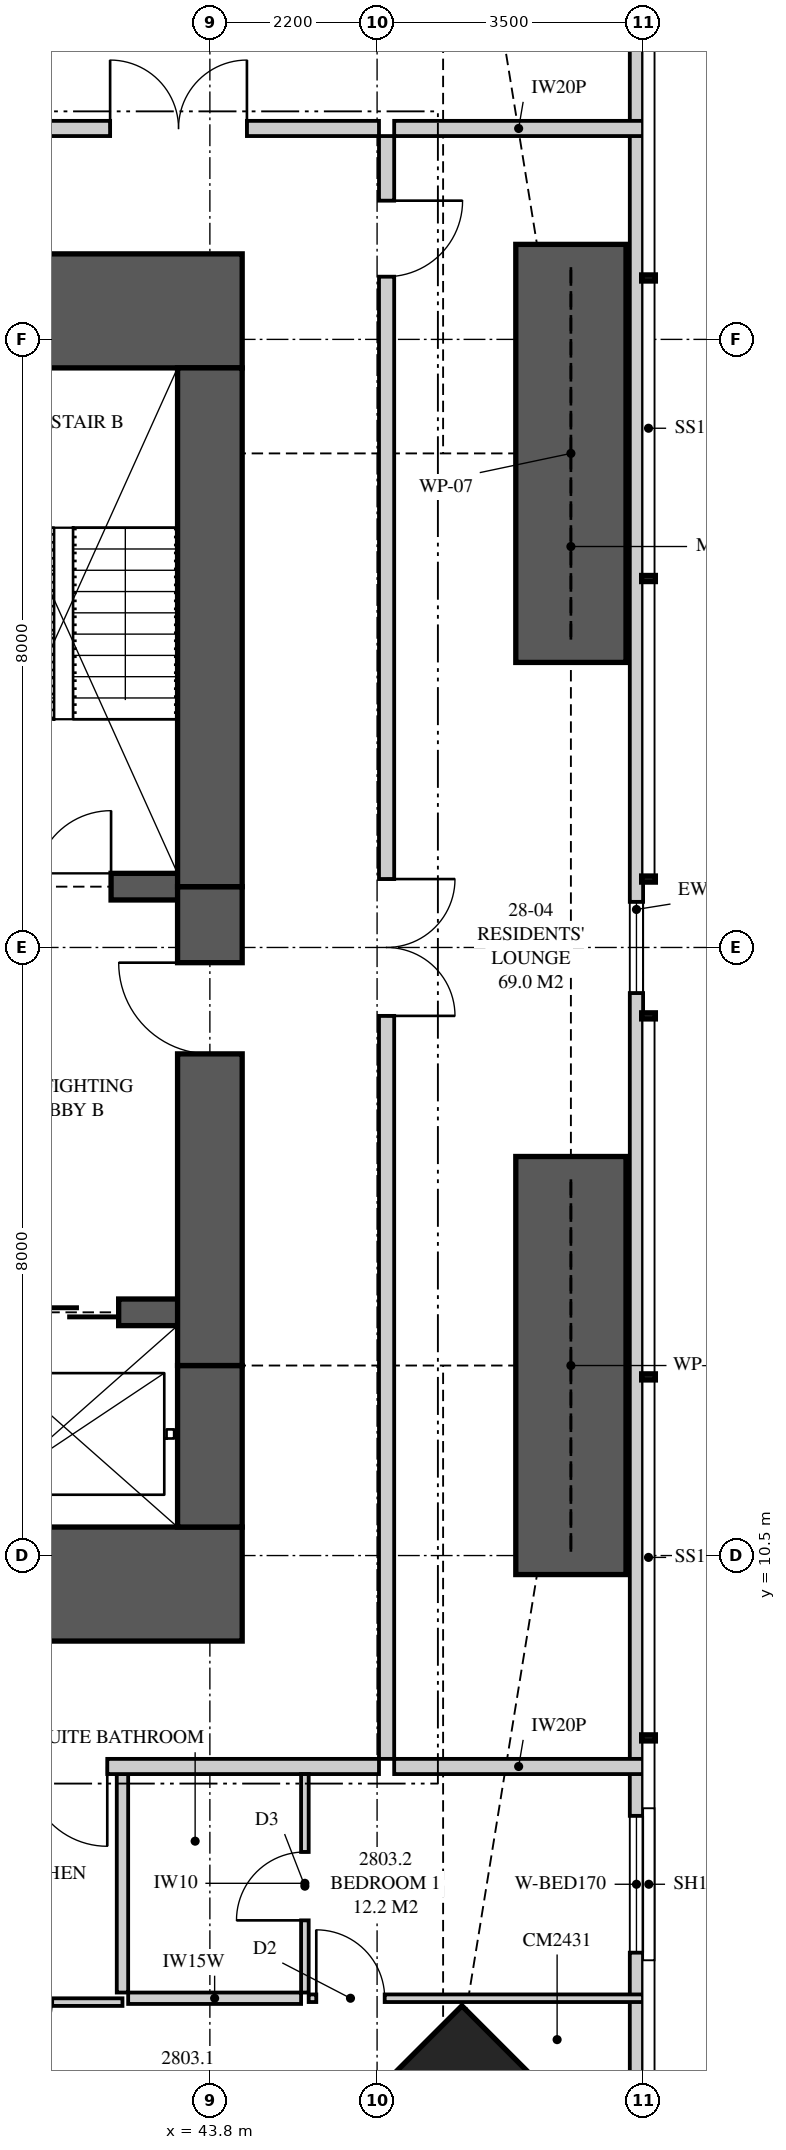
"""IFC4 building model, lengths in metres.
Left out: names, types, materials, properties, quantities, classifications, styles, units other than length and angle.
Written with IfcOpenShell. Run it as: python <this file> out.ifc"""

import sys

from ifc_helpers import new_model, si_unit, direction, frame, frame_2d, origin, origin_2d, place, context, subcontext, project, spatial, polyline, rectangle, outline, extrude, element, fill, save


model = new_model("IFC4")
c1 = context("Model", 3, precision=1e-05, world=origin(), true_north=direction((0.0, 1.0)))
c2 = subcontext(c1, "Body", "Model", "MODEL_VIEW")
j1 = project(units=[si_unit("LENGTHUNIT", "METRE"), si_unit("PLANEANGLEUNIT", "RADIAN")], contexts=[c1])
p1 = place(None, origin())
s1 = spatial("IfcSite", under=j1, at=p1, CompositionType="ELEMENT")
p2 = place(p1, origin())
s2 = spatial("IfcBuilding", under=s1, at=p2, CompositionType="ELEMENT")
p3 = place(p2, frame((0.0, 0.0, 104.85)))
s3 = spatial("IfcBuildingStorey", under=s2, at=p3, CompositionType="ELEMENT", Elevation=104.85)
p4 = place(p3, frame((46.869, 2.631, 0.0), z_axis=(0.0, 0.0, 1.0), x_axis=(-0.707106781187, 0.707106781187, 0.0)))
e1 = element("IfcColumn", 1, at=p4, inside=s3, PredefinedType="COLUMN", context=c2, shape_type="SweptSolid", body=[
    extrude(rectangle(XDim=2.4, YDim=3.1, at=origin_2d()), origin(), (0.0, 0.0, 1.0), 3.35),
])
p5 = place(p3, frame((35.9, 10.125, 0.0), z_axis=(0.0, 0.0, 1.0), x_axis=(1.0, 0.0, 0.0)))
e2 = element("IfcWall", 2, at=p5, inside=s3, PredefinedType="SHEAR", context=c2, shape_type="SweptSolid", body=[
    extrude(rectangle(XDim=8.325, YDim=1.5, at=frame_2d((4.163, 0.0))), origin(), (0.0, 0.0, 1.0), 3.35),
])
p6 = place(p5, frame((2.7, 0.0, 0.0)))
e3 = element("IfcOpeningElement", 3, at=p6, cuts=e2, PredefinedType="OPENING", context=c2, shape_type="SweptSolid", body=[
    extrude(rectangle(XDim=1.0, YDim=2.1, at=frame_2d((0.5, 1.05))), frame((0.0, 0.76, 0.0), z_axis=(0.0, -1.0, 0.0), x_axis=(1.0, 0.0, 0.0)), (0.0, 0.0, 1.0), 1.52),
])
p7 = place(p3, frame((44.225, 26.875, 0.0), z_axis=(0.0, 0.0, 1.0), x_axis=(-1.0, 0.0, 0.0)))
e4 = element("IfcWall", 4, at=p7, inside=s3, PredefinedType="SHEAR", context=c2, shape_type="SweptSolid", body=[
    extrude(rectangle(XDim=8.325, YDim=1.5, at=frame_2d((4.163, 0.0))), origin(), (0.0, 0.0, 1.0), 3.35),
])
p8 = place(p7, frame((5.725, 0.0, 0.0)))
e5 = element("IfcOpeningElement", 5, at=p8, cuts=e4, PredefinedType="OPENING", context=c2, shape_type="SweptSolid", body=[
    extrude(rectangle(XDim=0.9, YDim=2.1, at=frame_2d((0.45, 1.05))), frame((0.0, 0.76, 0.0), z_axis=(0.0, -1.0, 0.0), x_axis=(1.0, 0.0, 0.0)), (0.0, 0.0, 1.0), 1.52),
])
p9 = place(p3, frame((43.8, 10.875, 0.0), z_axis=(0.0, 0.0, 1.0), x_axis=(0.0, 1.0, 0.0)))
e6 = element("IfcWall", 6, at=p9, inside=s3, PredefinedType="SHEAR", context=c2, shape_type="SweptSolid", body=[
    extrude(rectangle(XDim=2.125, YDim=0.85, at=frame_2d((1.062, 0.0))), origin(), (0.0, 0.0, 1.0), 3.35),
])
p10 = place(p3, frame((43.8, 13.0, 0.0), z_axis=(0.0, 0.0, 1.0), x_axis=(0.0, 1.0, 0.0)))
e7 = element("IfcWall", 7, at=p10, inside=s3, PredefinedType="SHEAR", context=c2, shape_type="SweptSolid", body=[
    extrude(rectangle(XDim=6.3, YDim=0.85, at=frame_2d((3.15, 0.0))), origin(), (0.0, 0.0, 1.0), 3.35),
])
p11 = place(p10, frame((4.1, 0.0, 0.0)))
e8 = element("IfcOpeningElement", 8, at=p11, cuts=e7, PredefinedType="OPENING", context=c2, shape_type="SweptSolid", body=[
    extrude(rectangle(XDim=1.2, YDim=2.2, at=frame_2d((0.6, 1.1))), frame((0.0, 0.435, 0.0), z_axis=(0.0, -1.0, 0.0), x_axis=(1.0, 0.0, 0.0)), (0.0, 0.0, 1.0), 0.87),
])
p12 = place(p3, frame((43.8, 19.3, 0.0), z_axis=(0.0, 0.0, 1.0), x_axis=(0.0, 1.0, 0.0)))
e9 = element("IfcWall", 9, at=p12, inside=s3, PredefinedType="SHEAR", context=c2, shape_type="SweptSolid", body=[
    extrude(rectangle(XDim=6.825, YDim=0.85, at=frame_2d((3.413, 0.0))), origin(), (0.0, 0.0, 1.0), 3.35),
])
p13 = place(p3, frame((40.2, 13.7, 0.0), z_axis=(0.0, 0.0, 1.0), x_axis=(1.0, 0.0, 0.0)))
e10 = element("IfcWall", 10, at=p13, inside=s3, PredefinedType="SHEAR", context=c2, shape_type="SweptSolid", body=[
    extrude(rectangle(XDim=3.6, YDim=0.35, at=frame_2d((1.8, 0.0))), origin(), (0.0, 0.0, 1.0), 3.35),
])
p14 = place(p13, frame((1.2, 0.0, 0.0)))
e11 = element("IfcOpeningElement", 11, at=p14, cuts=e10, PredefinedType="OPENING", context=c2, shape_type="SweptSolid", body=[
    extrude(rectangle(XDim=1.2, YDim=2.1, at=frame_2d((0.6, 1.05))), frame((0.0, 0.185, 0.0), z_axis=(0.0, -1.0, 0.0), x_axis=(1.0, 0.0, 0.0)), (0.0, 0.0, 1.0), 0.37),
])
p15 = place(p3, frame((40.2, 19.3, 0.0), z_axis=(0.0, 0.0, 1.0), x_axis=(1.0, 0.0, 0.0)))
e12 = element("IfcWall", 12, at=p15, inside=s3, PredefinedType="SHEAR", context=c2, shape_type="SweptSolid", body=[
    extrude(rectangle(XDim=3.6, YDim=0.35, at=frame_2d((1.8, 0.0))), origin(), (0.0, 0.0, 1.0), 3.35),
])
p16 = place(p15, frame((1.3, 0.0, 0.0)))
e13 = element("IfcOpeningElement", 13, at=p16, cuts=e12, PredefinedType="OPENING", context=c2, shape_type="SweptSolid", body=[
    extrude(rectangle(XDim=1.0, YDim=2.1, at=frame_2d((0.5, 1.05))), frame((0.0, 0.185, 0.0), z_axis=(0.0, -1.0, 0.0), x_axis=(1.0, 0.0, 0.0)), (0.0, 0.0, 1.0), 0.37),
])
p17 = place(p3, frame((49.413, 3.051, 0.0), z_axis=(0.0, 0.0, 1.0), x_axis=(0.0, 1.0, 0.0)))
e14 = element("IfcWall", 14, at=p17, inside=s3, PredefinedType="SOLIDWALL", context=c2, shape_type="SweptSolid", body=[
    extrude(outline(polyline([(0.0, 0.0), (31.897, 0.0), (31.897, 3.11), (22.167, 3.11), (22.167, 2.15), (22.074, 2.15), (22.074, 3.11), (21.949, 3.11), (21.949, 2.15), (9.949, 2.15), (9.949, 3.11), (9.823, 3.11), (9.823, 2.15), (9.73, 2.15), (9.73, 3.11), (0.0, 3.11), (0.0, 0.0)])), frame((0.0, 0.087, 0.0), z_axis=(0.0, -1.0, 0.0), x_axis=(1.0, 0.0, 0.0)), (0.0, 0.0, 1.0), 0.175),
])
p18 = place(p17, frame((2.224, 0.0, 0.4)))
e15 = element("IfcOpeningElement", 15, at=p18, cuts=e14, PredefinedType="OPENING", context=c2, shape_type="SweptSolid", body=[
    extrude(rectangle(XDim=1.8, YDim=1.7, at=frame_2d((0.9, 0.85))), frame((0.0, 0.097, 0.0), z_axis=(0.0, -1.0, 0.0), x_axis=(1.0, 0.0, 0.0)), (0.0, 0.0, 1.0), 0.195),
])
p19 = place(p17, frame((14.849, 0.0, 0.4)))
e16 = element("IfcOpeningElement", 16, at=p19, cuts=e14, PredefinedType="OPENING", context=c2, shape_type="SweptSolid", body=[
    extrude(rectangle(XDim=1.2, YDim=1.7, at=frame_2d((0.6, 0.85))), frame((0.0, 0.097, 0.0), z_axis=(0.0, -1.0, 0.0), x_axis=(1.0, 0.0, 0.0)), (0.0, 0.0, 1.0), 0.195),
])
p20 = place(p17, frame((28.51, 0.0, 0.4)))
e17 = element("IfcOpeningElement", 17, at=p20, cuts=e14, PredefinedType="OPENING", context=c2, shape_type="SweptSolid", body=[
    extrude(rectangle(XDim=1.2, YDim=1.7, at=frame_2d((0.6, 0.85))), frame((0.0, 0.097, 0.0), z_axis=(0.0, -1.0, 0.0), x_axis=(1.0, 0.0, 0.0)), (0.0, 0.0, 1.0), 0.195),
])
p21 = place(p3, frame((39.9, 7.725, 0.0), z_axis=(0.0, 0.0, 1.0), x_axis=(1.0, 0.0, 0.0)))
e18 = element("IfcWall", 18, at=p21, inside=s3, PredefinedType="PARTITIONING", context=c2, shape_type="SweptSolid", body=[
    extrude(rectangle(XDim=6.125, YDim=0.2, at=frame_2d((3.062, 0.0))), origin(), (0.0, 0.0, 1.0), 3.11),
])
p22 = place(p21, frame((1.5, 0.0, 0.0)))
e19 = element("IfcOpeningElement", 19, at=p22, cuts=e18, PredefinedType="OPENING", context=c2, shape_type="SweptSolid", body=[
    extrude(rectangle(XDim=1.05, YDim=2.2, at=frame_2d((0.525, 1.1))), frame((0.0, 0.11, 0.0), z_axis=(0.0, -1.0, 0.0), x_axis=(1.0, 0.0, 0.0)), (0.0, 0.0, 1.0), 0.22),
])
p23 = place(p3, frame((45.05, 4.751, 0.0), z_axis=(0.0, 0.0, 1.0), x_axis=(0.0, 1.0, 0.0)))
e20 = element("IfcWall", 20, at=p23, inside=s3, PredefinedType="PARTITIONING", context=c2, shape_type="SweptSolid", body=[
    extrude(rectangle(XDim=2.874, YDim=0.1, at=frame_2d((1.437, 0.0))), origin(), (0.0, 0.0, 1.0), 3.11),
])
p24 = place(p23, frame((0.949, 0.0, 0.0)))
e21 = element("IfcOpeningElement", 21, at=p24, cuts=e20, PredefinedType="OPENING", context=c2, shape_type="SweptSolid", body=[
    extrude(rectangle(XDim=0.9, YDim=2.1, at=frame_2d((0.45, 1.05))), frame((0.0, 0.06, 0.0), z_axis=(0.0, -1.0, 0.0), x_axis=(1.0, 0.0, 0.0)), (0.0, 0.0, 1.0), 0.12),
])
p25 = place(p3, frame((45.1, 4.676, 0.0), z_axis=(0.0, 0.0, 1.0), x_axis=(1.0, 0.0, 0.0)))
e22 = element("IfcWall", 22, at=p25, inside=s3, PredefinedType="PARTITIONING", context=c2, shape_type="SweptSolid", body=[
    extrude(outline(polyline([(0.0, 0.0), (4.4, 0.0), (4.4, 3.11), (2.971, 3.11), (2.971, 2.15), (1.229, 2.15), (1.229, 3.11), (0.0, 3.11), (0.0, 0.0)])), frame((0.0, 0.05, 0.0), z_axis=(0.0, -1.0, 0.0), x_axis=(1.0, 0.0, 0.0)), (0.0, 0.0, 1.0), 0.1),
])
p26 = place(p25, frame((0.1, 0.0, 0.0)))
e23 = element("IfcOpeningElement", 23, at=p26, cuts=e22, PredefinedType="OPENING", context=c2, shape_type="SweptSolid", body=[
    extrude(rectangle(XDim=0.9, YDim=2.1, at=frame_2d((0.45, 1.05))), frame((0.0, 0.06, 0.0), z_axis=(0.0, -1.0, 0.0), x_axis=(1.0, 0.0, 0.0)), (0.0, 0.0, 1.0), 0.12),
])
p27 = place(p3, frame((42.725, 4.676, 0.0), z_axis=(0.0, 0.0, 1.0), x_axis=(1.0, 0.0, 0.0)))
e24 = element("IfcWall", 24, at=p27, inside=s3, PredefinedType="PLUMBINGWALL", context=c2, shape_type="SweptSolid", body=[
    extrude(rectangle(XDim=2.275, YDim=0.15, at=frame_2d((1.137, 0.0))), origin(), (0.0, 0.0, 1.0), 3.11),
])
p28 = place(p3, frame((42.65, 4.751, 0.0), z_axis=(0.0, 0.0, 1.0), x_axis=(0.0, 1.0, 0.0)))
e25 = element("IfcWall", 25, at=p28, inside=s3, PredefinedType="PLUMBINGWALL", context=c2, shape_type="SweptSolid", body=[
    extrude(rectangle(XDim=2.874, YDim=0.15, at=frame_2d((1.437, 0.0))), origin(), (0.0, 0.0, 1.0), 3.11),
])
p29 = place(p3, frame((39.9, 4.625, 0.0), z_axis=(0.0, 0.0, 1.0), x_axis=(1.0, 0.0, 0.0)))
e26 = element("IfcWall", 26, at=p29, inside=s3, PredefinedType="PARTITIONING", context=c2, shape_type="SweptSolid", body=[
    extrude(rectangle(XDim=2.75, YDim=0.1, at=frame_2d((1.375, 0.0))), origin(), (0.0, 0.0, 1.0), 3.11),
])
p30 = place(p29, frame((0.925, 0.0, 0.0)))
e27 = element("IfcOpeningElement", 27, at=p30, cuts=e26, PredefinedType="OPENING", context=c2, shape_type="SweptSolid", body=[
    extrude(rectangle(XDim=0.9, YDim=2.1, at=frame_2d((0.45, 1.05))), frame((0.0, 0.06, 0.0), z_axis=(0.0, -1.0, 0.0), x_axis=(1.0, 0.0, 0.0)), (0.0, 0.0, 1.0), 0.12),
])
p31 = place(p3, frame((46.225, 7.725, 0.0), z_axis=(0.0, 0.0, 1.0), x_axis=(1.0, 0.0, 0.0)))
e28 = element("IfcWall", 28, at=p31, inside=s3, PredefinedType="PARTITIONING", context=c2, shape_type="SweptSolid", body=[
    extrude(outline(polyline([(0.0, 0.0), (3.275, 0.0), (3.275, 3.11), (2.392, 3.11), (2.392, 2.15), (0.643, 2.15), (0.643, 2.541), (0.306, 2.541), (0.306, 3.11), (0.0, 3.11), (0.0, 0.0)])), frame((0.0, 0.1, 0.0), z_axis=(0.0, -1.0, 0.0), x_axis=(1.0, 0.0, 0.0)), (0.0, 0.0, 1.0), 0.2),
])
p32 = place(p3, frame((40.75, 29.275, 0.0), z_axis=(0.0, 0.0, 1.0), x_axis=(1.0, 0.0, 0.0)))
e29 = element("IfcWall", 29, at=p32, inside=s3, PredefinedType="PARTITIONING", context=c2, shape_type="SweptSolid", body=[
    extrude(rectangle(XDim=5.275, YDim=0.2, at=frame_2d((2.637, 0.0))), origin(), (0.0, 0.0, 1.0), 3.11),
])
p33 = place(p32, frame((1.738, 0.0, 0.0)))
e30 = element("IfcOpeningElement", 30, at=p33, cuts=e29, PredefinedType="OPENING", context=c2, shape_type="SweptSolid", body=[
    extrude(rectangle(XDim=1.8, YDim=2.1, at=frame_2d((0.9, 1.05))), frame((0.0, 0.11, 0.0), z_axis=(0.0, -1.0, 0.0), x_axis=(1.0, 0.0, 0.0)), (0.0, 0.0, 1.0), 0.22),
])
p34 = place(p3, frame((46.225, 29.275, 0.0), z_axis=(0.0, 0.0, 1.0), x_axis=(1.0, 0.0, 0.0)))
e31 = element("IfcWall", 31, at=p34, inside=s3, PredefinedType="PARTITIONING", context=c2, shape_type="SweptSolid", body=[
    extrude(outline(polyline([(0.0, 0.0), (3.275, 0.0), (3.275, 3.11), (2.554, 3.11), (2.554, 2.15), (0.805, 2.15), (0.805, 2.541), (0.306, 2.541), (0.306, 3.11), (0.0, 3.11), (0.0, 0.0)])), frame((0.0, 0.1, 0.0), z_axis=(0.0, -1.0, 0.0), x_axis=(1.0, 0.0, 0.0)), (0.0, 0.0, 1.0), 0.2),
])
p35 = place(p3, frame((46.125, 7.825, 0.0), z_axis=(0.0, 0.0, 1.0), x_axis=(0.0, 1.0, 0.0)))
e32 = element("IfcWall", 32, at=p35, inside=s3, PredefinedType="PARTITIONING", context=c2, shape_type="SweptSolid", body=[
    extrude(outline(polyline([(0.0, 0.0), (21.35, 0.0), (21.35, 3.11), (17.512, 3.11), (17.512, 2.541), (16.838, 2.541), (16.838, 3.11), (5.512, 3.11), (5.512, 2.541), (4.838, 2.541), (4.838, 3.11), (0.0, 3.11), (0.0, 0.0)])), frame((0.0, 0.1, 0.0), z_axis=(0.0, -1.0, 0.0), x_axis=(1.0, 0.0, 0.0)), (0.0, 0.0, 1.0), 0.2),
])
p36 = place(p35, frame((9.775, 0.0, 0.0)))
e33 = element("IfcOpeningElement", 33, at=p36, cuts=e32, PredefinedType="OPENING", context=c2, shape_type="SweptSolid", body=[
    extrude(rectangle(XDim=1.8, YDim=2.1, at=frame_2d((0.9, 1.05))), frame((0.0, 0.11, 0.0), z_axis=(0.0, -1.0, 0.0), x_axis=(1.0, 0.0, 0.0)), (0.0, 0.0, 1.0), 0.22),
])
p37 = place(p35, frame((19.5, 0.0, 0.0)))
e34 = element("IfcOpeningElement", 34, at=p37, cuts=e32, PredefinedType="OPENING", context=c2, shape_type="SweptSolid", body=[
    extrude(rectangle(XDim=1.0, YDim=2.1, at=frame_2d((0.5, 1.05))), frame((0.0, 0.11, 0.0), z_axis=(0.0, -1.0, 0.0), x_axis=(1.0, 0.0, 0.0)), (0.0, 0.0, 1.0), 0.22),
])
for number, where, z_axis, x_axis in (
    (35, (48.55, 10.25, 0.0), (0.0, 0.0, 1.0), (0.0, 1.0, 0.0)),
    (36, (48.55, 22.25, 0.0), (0.0, 0.0, 1.0), (0.0, 1.0, 0.0)),
):
    element("IfcWall", number, at=place(p3, frame(where, z_axis=z_axis, x_axis=x_axis)), inside=s3, PredefinedType="SHEAR", context=c2, shape_type="SweptSolid", body=[
        extrude(rectangle(XDim=5.5, YDim=1.45, at=frame_2d((2.75, 0.0))), origin(), (0.0, 0.0, 1.0), 3.35),
    ])
p38 = place(p18, origin())
e37 = element("IfcWindow", 37, at=p38, inside=s3, PartitioningType="SINGLE_PANEL", PredefinedType="WINDOW", context=c2, shape_type="SweptSolid", body=[
    extrude(rectangle(XDim=1.8, YDim=1.7, at=frame_2d((0.9, 0.85))), frame((0.0, 0.03, 0.0), z_axis=(0.0, -1.0, 0.0), x_axis=(1.0, 0.0, 0.0)), (0.0, 0.0, 1.0), 0.06),
])
fill(e15, e37)
p39 = place(p19, origin())
e38 = element("IfcWindow", 38, at=p39, inside=s3, PartitioningType="SINGLE_PANEL", PredefinedType="WINDOW", context=c2, shape_type="SweptSolid", body=[
    extrude(rectangle(XDim=1.2, YDim=1.7, at=frame_2d((0.6, 0.85))), frame((0.0, 0.03, 0.0), z_axis=(0.0, -1.0, 0.0), x_axis=(1.0, 0.0, 0.0)), (0.0, 0.0, 1.0), 0.06),
])
fill(e16, e38)
p40 = place(p22, frame((1.05, 0.0, 0.0), z_axis=(0.0, 0.0, 1.0), x_axis=(-1.0, 0.0, 0.0)))
e39 = element("IfcDoor", 39, at=p40, inside=s3, OperationType="SINGLE_SWING_LEFT", PredefinedType="DOOR", context=c2, shape_type="SweptSolid", body=[
    extrude(rectangle(XDim=1.05, YDim=2.2, at=frame_2d((0.525, 1.1))), frame((0.0, 0.025, 0.0), z_axis=(0.0, -1.0, 0.0), x_axis=(1.0, 0.0, 0.0)), (0.0, 0.0, 1.0), 0.05),
])
fill(e19, e39)
p41 = place(p26, origin())
e40 = element("IfcDoor", 40, at=p41, inside=s3, OperationType="SINGLE_SWING_LEFT", PredefinedType="DOOR", context=c2, shape_type="SweptSolid", body=[
    extrude(rectangle(XDim=0.9, YDim=2.1, at=frame_2d((0.45, 1.05))), frame((0.0, 0.025, 0.0), z_axis=(0.0, -1.0, 0.0), x_axis=(1.0, 0.0, 0.0)), (0.0, 0.0, 1.0), 0.05),
])
fill(e23, e40)
p42 = place(p24, origin())
e41 = element("IfcDoor", 41, at=p42, inside=s3, OperationType="SINGLE_SWING_LEFT", PredefinedType="DOOR", context=c2, shape_type="SweptSolid", body=[
    extrude(rectangle(XDim=0.9, YDim=2.1, at=frame_2d((0.45, 1.05))), frame((0.0, 0.025, 0.0), z_axis=(0.0, -1.0, 0.0), x_axis=(1.0, 0.0, 0.0)), (0.0, 0.0, 1.0), 0.05),
])
fill(e21, e41)
p43 = place(p33, origin())
e42 = element("IfcDoor", 42, at=p43, inside=s3, OperationType="DOUBLE_DOOR_SINGLE_SWING", PredefinedType="DOOR", context=c2, shape_type="SweptSolid", body=[
    extrude(rectangle(XDim=1.8, YDim=2.1, at=frame_2d((0.9, 1.05))), frame((0.0, 0.025, 0.0), z_axis=(0.0, -1.0, 0.0), x_axis=(1.0, 0.0, 0.0)), (0.0, 0.0, 1.0), 0.05),
])
fill(e30, e42)
p44 = place(p36, frame((1.8, 0.0, 0.0), z_axis=(0.0, 0.0, 1.0), x_axis=(-1.0, 0.0, 0.0)))
e43 = element("IfcDoor", 43, at=p44, inside=s3, OperationType="DOUBLE_DOOR_SINGLE_SWING", PredefinedType="DOOR", context=c2, shape_type="SweptSolid", body=[
    extrude(rectangle(XDim=1.8, YDim=2.1, at=frame_2d((0.9, 1.05))), frame((0.0, 0.025, 0.0), z_axis=(0.0, -1.0, 0.0), x_axis=(1.0, 0.0, 0.0)), (0.0, 0.0, 1.0), 0.05),
])
fill(e33, e43)
p45 = place(p37, frame((1.0, 0.0, 0.0), z_axis=(0.0, 0.0, 1.0), x_axis=(-1.0, 0.0, 0.0)))
e44 = element("IfcDoor", 44, at=p45, inside=s3, OperationType="SINGLE_SWING_LEFT", PredefinedType="DOOR", context=c2, shape_type="SweptSolid", body=[
    extrude(rectangle(XDim=1.0, YDim=2.1, at=frame_2d((0.5, 1.05))), frame((0.0, 0.025, 0.0), z_axis=(0.0, -1.0, 0.0), x_axis=(1.0, 0.0, 0.0)), (0.0, 0.0, 1.0), 0.05),
])
fill(e34, e44)
p46 = place(p16, origin())
e45 = element("IfcDoor", 45, at=p46, inside=s3, OperationType="SINGLE_SWING_RIGHT", PredefinedType="DOOR", context=c2, shape_type="SweptSolid", body=[
    extrude(rectangle(XDim=1.0, YDim=2.1, at=frame_2d((0.5, 1.05))), frame((0.0, 0.025, 0.0), z_axis=(0.0, -1.0, 0.0), x_axis=(1.0, 0.0, 0.0)), (0.0, 0.0, 1.0), 0.05),
])
fill(e13, e45)
p47 = place(p11, origin())
e46 = element("IfcDoor", 46, at=p47, inside=s3, OperationType="SINGLE_SWING_RIGHT", PredefinedType="DOOR", context=c2, shape_type="SweptSolid", body=[
    extrude(rectangle(XDim=1.2, YDim=2.2, at=frame_2d((0.6, 1.1))), frame((0.0, 0.025, 0.0), z_axis=(0.0, -1.0, 0.0), x_axis=(1.0, 0.0, 0.0)), (0.0, 0.0, 1.0), 0.05),
])
fill(e8, e46)
p48 = place(p14, origin())
e47 = element("IfcDoor", 47, at=p48, inside=s3, OperationType="SLIDING_TO_LEFT", PredefinedType="DOOR", context=c2, shape_type="SweptSolid", body=[
    extrude(rectangle(XDim=1.2, YDim=2.1, at=frame_2d((0.6, 1.05))), frame((0.0, 0.025, 0.0), z_axis=(0.0, -1.0, 0.0), x_axis=(1.0, 0.0, 0.0)), (0.0, 0.0, 1.0), 0.05),
])
fill(e11, e47)
save(model, sys.argv[1])
